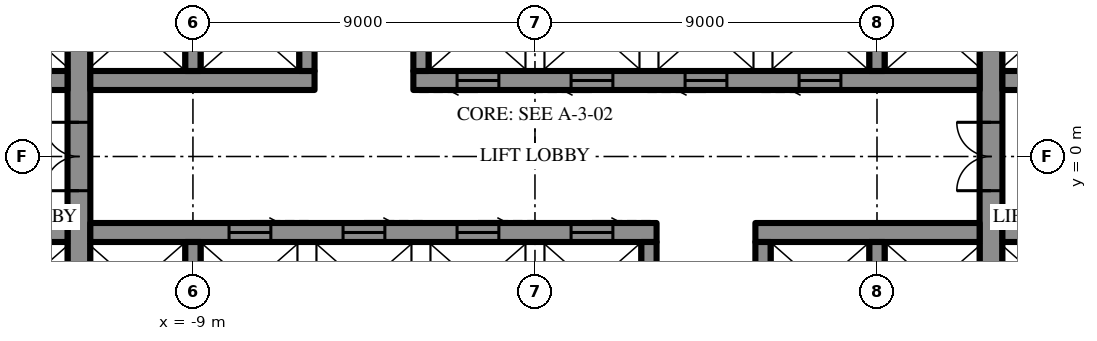
"""IFC4 building model, lengths in metres.
Left out: names, types, materials, properties, quantities, classifications, styles, units other than length and angle.
Written with IfcOpenShell. Run it as: python <this file> out.ifc"""

import sys

from ifc_helpers import new_model, si_unit, direction, frame, frame_2d, origin, place, context, subcontext, project, spatial, rectangle, extrude, element, fill, save


model = new_model("IFC4")
c1 = context("Model", 3, precision=1e-05, world=origin(), true_north=direction((0.0, 1.0)))
c2 = subcontext(c1, "Body", "Model", "MODEL_VIEW")
j1 = project(units=[si_unit("LENGTHUNIT", "METRE"), si_unit("PLANEANGLEUNIT", "RADIAN")], contexts=[c1])
p1 = place(None, origin())
s1 = spatial("IfcSite", under=j1, at=p1, CompositionType="ELEMENT")
p2 = place(p1, origin())
s2 = spatial("IfcBuilding", under=s1, at=p2, CompositionType="ELEMENT")
p3 = place(p2, frame((0.0, 0.0, 195.1)))
s3 = spatial("IfcBuildingStorey", under=s2, at=p3, CompositionType="ELEMENT", Elevation=195.1)
p4 = place(p3, frame((12.0, -10.7, 0.0), z_axis=(0.0, 0.0, 1.0), x_axis=(0.0, 1.0, 0.0)))
e1 = element("IfcWall", 1, at=p4, inside=s3, PredefinedType="SHEAR", context=c2, shape_type="SweptSolid", body=[
    extrude(rectangle(XDim=21.4, YDim=0.6, at=frame_2d((10.7, 0.0))), origin(), (0.0, 0.0, 1.0), 4.2),
])
p5 = place(p4, frame((9.8, 0.0, 0.0)))
e2 = element("IfcOpeningElement", 2, at=p5, cuts=e1, PredefinedType="OPENING", context=c2, shape_type="SweptSolid", body=[
    extrude(rectangle(XDim=1.8, YDim=2.4, at=frame_2d((0.9, 1.2))), frame((0.0, 0.31, 0.0), z_axis=(0.0, -1.0, 0.0), x_axis=(1.0, 0.0, 0.0)), (0.0, 0.0, 1.0), 0.62),
])
p6 = place(p3, frame((-12.0, -10.7, 0.0), z_axis=(0.0, 0.0, 1.0), x_axis=(0.0, 1.0, 0.0)))
e3 = element("IfcWall", 3, at=p6, inside=s3, PredefinedType="SHEAR", context=c2, shape_type="SweptSolid", body=[
    extrude(rectangle(XDim=21.4, YDim=0.6, at=frame_2d((10.7, 0.0))), origin(), (0.0, 0.0, 1.0), 4.2),
])
p7 = place(p6, frame((9.8, 0.0, 0.0)))
e4 = element("IfcOpeningElement", 4, at=p7, cuts=e3, PredefinedType="OPENING", context=c2, shape_type="SweptSolid", body=[
    extrude(rectangle(XDim=1.8, YDim=2.4, at=frame_2d((0.9, 1.2))), frame((0.0, 0.31, 0.0), z_axis=(0.0, -1.0, 0.0), x_axis=(1.0, 0.0, 0.0)), (0.0, 0.0, 1.0), 0.62),
])
p8 = place(p3, frame((-14.7, 2.0, 0.0), z_axis=(0.0, 0.0, 1.0), x_axis=(1.0, 0.0, 0.0)))
e5 = element("IfcWall", 5, at=p8, inside=s3, PredefinedType="SHEAR", context=c2, shape_type="SweptSolid", body=[
    extrude(rectangle(XDim=2.4, YDim=0.5, at=frame_2d((1.2, 0.0))), origin(), (0.0, 0.0, 1.0), 4.2),
])
p9 = place(p3, frame((-11.7, 2.0, 0.0), z_axis=(0.0, 0.0, 1.0), x_axis=(1.0, 0.0, 0.0)))
e6 = element("IfcWall", 6, at=p9, inside=s3, PredefinedType="SHEAR", context=c2, shape_type="SweptSolid", body=[
    extrude(rectangle(XDim=5.9, YDim=0.5, at=frame_2d((2.95, 0.0))), origin(), (0.0, 0.0, 1.0), 4.2),
])
p10 = place(p3, frame((-3.2, 2.0, 0.0), z_axis=(0.0, 0.0, 1.0), x_axis=(1.0, 0.0, 0.0)))
e7 = element("IfcWall", 7, at=p10, inside=s3, PredefinedType="SHEAR", context=c2, shape_type="SweptSolid", body=[
    extrude(rectangle(XDim=14.9, YDim=0.5, at=frame_2d((7.45, 0.0))), origin(), (0.0, 0.0, 1.0), 4.2),
])
p11 = place(p10, frame((1.15, 0.0, 0.0)))
e8 = element("IfcOpeningElement", 8, at=p11, cuts=e7, PredefinedType="OPENING", context=c2, shape_type="SweptSolid", body=[
    extrude(rectangle(XDim=1.1, YDim=2.2, at=frame_2d((0.55, 1.1))), frame((0.0, 0.26, 0.0), z_axis=(0.0, -1.0, 0.0), x_axis=(1.0, 0.0, 0.0)), (0.0, 0.0, 1.0), 0.52),
])
p12 = place(p10, frame((4.15, 0.0, 0.0)))
e9 = element("IfcOpeningElement", 9, at=p12, cuts=e7, PredefinedType="OPENING", context=c2, shape_type="SweptSolid", body=[
    extrude(rectangle(XDim=1.1, YDim=2.2, at=frame_2d((0.55, 1.1))), frame((0.0, 0.26, 0.0), z_axis=(0.0, -1.0, 0.0), x_axis=(1.0, 0.0, 0.0)), (0.0, 0.0, 1.0), 0.52),
])
p13 = place(p10, frame((7.15, 0.0, 0.0)))
e10 = element("IfcOpeningElement", 10, at=p13, cuts=e7, PredefinedType="OPENING", context=c2, shape_type="SweptSolid", body=[
    extrude(rectangle(XDim=1.1, YDim=2.2, at=frame_2d((0.55, 1.1))), frame((0.0, 0.26, 0.0), z_axis=(0.0, -1.0, 0.0), x_axis=(1.0, 0.0, 0.0)), (0.0, 0.0, 1.0), 0.52),
])
p14 = place(p10, frame((10.15, 0.0, 0.0)))
e11 = element("IfcOpeningElement", 11, at=p14, cuts=e7, PredefinedType="OPENING", context=c2, shape_type="SweptSolid", body=[
    extrude(rectangle(XDim=1.1, YDim=2.2, at=frame_2d((0.55, 1.1))), frame((0.0, 0.26, 0.0), z_axis=(0.0, -1.0, 0.0), x_axis=(1.0, 0.0, 0.0)), (0.0, 0.0, 1.0), 0.52),
])
p15 = place(p3, frame((12.3, 2.0, 0.0), z_axis=(0.0, 0.0, 1.0), x_axis=(1.0, 0.0, 0.0)))
e12 = element("IfcWall", 12, at=p15, inside=s3, PredefinedType="SHEAR", context=c2, shape_type="SweptSolid", body=[
    extrude(rectangle(XDim=2.4, YDim=0.5, at=frame_2d((1.2, 0.0))), origin(), (0.0, 0.0, 1.0), 4.2),
])
for number, where, z_axis, x_axis in (
    (13, (-9.0, 2.25, 0.0), (0.0, 0.0, 1.0), (0.0, 1.0, 0.0)),
    (14, (-6.0, 2.25, 0.0), (0.0, 0.0, 1.0), (0.0, 1.0, 0.0)),
    (15, (-3.0, 2.25, 0.0), (0.0, 0.0, 1.0), (0.0, 1.0, 0.0)),
    (16, (9.0, 2.25, 0.0), (0.0, 0.0, 1.0), (0.0, 1.0, 0.0)),
):
    element("IfcWall", number, at=place(p3, frame(where, z_axis=z_axis, x_axis=x_axis)), inside=s3, PredefinedType="SHEAR", context=c2, shape_type="SweptSolid", body=[
        extrude(rectangle(XDim=2.3, YDim=0.4, at=frame_2d((1.15, 0.0))), origin(), (0.0, 0.0, 1.0), 4.2),
    ])
p16 = place(p3, frame((14.7, -2.0, 0.0), z_axis=(0.0, 0.0, 1.0), x_axis=(-1.0, 0.0, 0.0)))
e17 = element("IfcWall", 17, at=p16, inside=s3, PredefinedType="SHEAR", context=c2, shape_type="SweptSolid", body=[
    extrude(rectangle(XDim=2.4, YDim=0.5, at=frame_2d((1.2, 0.0))), origin(), (0.0, 0.0, 1.0), 4.2),
])
p17 = place(p3, frame((11.7, -2.0, 0.0), z_axis=(0.0, 0.0, 1.0), x_axis=(-1.0, 0.0, 0.0)))
e18 = element("IfcWall", 18, at=p17, inside=s3, PredefinedType="SHEAR", context=c2, shape_type="SweptSolid", body=[
    extrude(rectangle(XDim=5.9, YDim=0.5, at=frame_2d((2.95, 0.0))), origin(), (0.0, 0.0, 1.0), 4.2),
])
p18 = place(p3, frame((3.2, -2.0, 0.0), z_axis=(0.0, 0.0, 1.0), x_axis=(-1.0, 0.0, 0.0)))
e19 = element("IfcWall", 19, at=p18, inside=s3, PredefinedType="SHEAR", context=c2, shape_type="SweptSolid", body=[
    extrude(rectangle(XDim=14.9, YDim=0.5, at=frame_2d((7.45, 0.0))), origin(), (0.0, 0.0, 1.0), 4.2),
])
p19 = place(p18, frame((1.15, 0.0, 0.0)))
e20 = element("IfcOpeningElement", 20, at=p19, cuts=e19, PredefinedType="OPENING", context=c2, shape_type="SweptSolid", body=[
    extrude(rectangle(XDim=1.1, YDim=2.2, at=frame_2d((0.55, 1.1))), frame((0.0, 0.26, 0.0), z_axis=(0.0, -1.0, 0.0), x_axis=(1.0, 0.0, 0.0)), (0.0, 0.0, 1.0), 0.52),
])
p20 = place(p18, frame((4.15, 0.0, 0.0)))
e21 = element("IfcOpeningElement", 21, at=p20, cuts=e19, PredefinedType="OPENING", context=c2, shape_type="SweptSolid", body=[
    extrude(rectangle(XDim=1.1, YDim=2.2, at=frame_2d((0.55, 1.1))), frame((0.0, 0.26, 0.0), z_axis=(0.0, -1.0, 0.0), x_axis=(1.0, 0.0, 0.0)), (0.0, 0.0, 1.0), 0.52),
])
p21 = place(p18, frame((7.15, 0.0, 0.0)))
e22 = element("IfcOpeningElement", 22, at=p21, cuts=e19, PredefinedType="OPENING", context=c2, shape_type="SweptSolid", body=[
    extrude(rectangle(XDim=1.1, YDim=2.2, at=frame_2d((0.55, 1.1))), frame((0.0, 0.26, 0.0), z_axis=(0.0, -1.0, 0.0), x_axis=(1.0, 0.0, 0.0)), (0.0, 0.0, 1.0), 0.52),
])
p22 = place(p18, frame((10.15, 0.0, 0.0)))
e23 = element("IfcOpeningElement", 23, at=p22, cuts=e19, PredefinedType="OPENING", context=c2, shape_type="SweptSolid", body=[
    extrude(rectangle(XDim=1.1, YDim=2.2, at=frame_2d((0.55, 1.1))), frame((0.0, 0.26, 0.0), z_axis=(0.0, -1.0, 0.0), x_axis=(1.0, 0.0, 0.0)), (0.0, 0.0, 1.0), 0.52),
])
p23 = place(p3, frame((-12.3, -2.0, 0.0), z_axis=(0.0, 0.0, 1.0), x_axis=(-1.0, 0.0, 0.0)))
e24 = element("IfcWall", 24, at=p23, inside=s3, PredefinedType="SHEAR", context=c2, shape_type="SweptSolid", body=[
    extrude(rectangle(XDim=2.4, YDim=0.5, at=frame_2d((1.2, 0.0))), origin(), (0.0, 0.0, 1.0), 4.2),
])
for number, where, z_axis, x_axis in (
    (25, (9.0, -2.25, 0.0), (0.0, 0.0, 1.0), (0.0, -1.0, 0.0)),
    (26, (6.0, -2.25, 0.0), (0.0, 0.0, 1.0), (0.0, -1.0, 0.0)),
    (27, (3.0, -2.25, 0.0), (0.0, 0.0, 1.0), (0.0, -1.0, 0.0)),
    (28, (-9.0, -2.25, 0.0), (0.0, 0.0, 1.0), (0.0, -1.0, 0.0)),
):
    element("IfcWall", number, at=place(p3, frame(where, z_axis=z_axis, x_axis=x_axis)), inside=s3, PredefinedType="SHEAR", context=c2, shape_type="SweptSolid", body=[
        extrude(rectangle(XDim=2.3, YDim=0.4, at=frame_2d((1.15, 0.0))), origin(), (0.0, 0.0, 1.0), 4.2),
    ])
p24 = place(p5, origin())
e29 = element("IfcDoor", 29, at=p24, inside=s3, OperationType="DOUBLE_DOOR_SINGLE_SWING", PredefinedType="DOOR", context=c2, shape_type="SweptSolid", body=[
    extrude(rectangle(XDim=1.8, YDim=2.4, at=frame_2d((0.9, 1.2))), frame((0.0, 0.025, 0.0), z_axis=(0.0, -1.0, 0.0), x_axis=(1.0, 0.0, 0.0)), (0.0, 0.0, 1.0), 0.05),
])
fill(e2, e29)
p25 = place(p7, origin())
e30 = element("IfcDoor", 30, at=p25, inside=s3, OperationType="DOUBLE_DOOR_SINGLE_SWING", PredefinedType="DOOR", context=c2, shape_type="SweptSolid", body=[
    extrude(rectangle(XDim=1.8, YDim=2.4, at=frame_2d((0.9, 1.2))), frame((0.0, 0.025, 0.0), z_axis=(0.0, -1.0, 0.0), x_axis=(1.0, 0.0, 0.0)), (0.0, 0.0, 1.0), 0.05),
])
fill(e4, e30)
p26 = place(p11, frame((1.1, 0.0, 0.0), z_axis=(0.0, 0.0, 1.0), x_axis=(-1.0, 0.0, 0.0)))
e31 = element("IfcDoor", 31, at=p26, inside=s3, OperationType="SLIDING_TO_LEFT", PredefinedType="DOOR", context=c2, shape_type="SweptSolid", body=[
    extrude(rectangle(XDim=1.1, YDim=2.2, at=frame_2d((0.55, 1.1))), frame((0.0, 0.025, 0.0), z_axis=(0.0, -1.0, 0.0), x_axis=(1.0, 0.0, 0.0)), (0.0, 0.0, 1.0), 0.05),
])
fill(e8, e31)
p27 = place(p12, frame((1.1, 0.0, 0.0), z_axis=(0.0, 0.0, 1.0), x_axis=(-1.0, 0.0, 0.0)))
e32 = element("IfcDoor", 32, at=p27, inside=s3, OperationType="SLIDING_TO_LEFT", PredefinedType="DOOR", context=c2, shape_type="SweptSolid", body=[
    extrude(rectangle(XDim=1.1, YDim=2.2, at=frame_2d((0.55, 1.1))), frame((0.0, 0.025, 0.0), z_axis=(0.0, -1.0, 0.0), x_axis=(1.0, 0.0, 0.0)), (0.0, 0.0, 1.0), 0.05),
])
fill(e9, e32)
p28 = place(p13, frame((1.1, 0.0, 0.0), z_axis=(0.0, 0.0, 1.0), x_axis=(-1.0, 0.0, 0.0)))
e33 = element("IfcDoor", 33, at=p28, inside=s3, OperationType="SLIDING_TO_LEFT", PredefinedType="DOOR", context=c2, shape_type="SweptSolid", body=[
    extrude(rectangle(XDim=1.1, YDim=2.2, at=frame_2d((0.55, 1.1))), frame((0.0, 0.025, 0.0), z_axis=(0.0, -1.0, 0.0), x_axis=(1.0, 0.0, 0.0)), (0.0, 0.0, 1.0), 0.05),
])
fill(e10, e33)
p29 = place(p14, frame((1.1, 0.0, 0.0), z_axis=(0.0, 0.0, 1.0), x_axis=(-1.0, 0.0, 0.0)))
e34 = element("IfcDoor", 34, at=p29, inside=s3, OperationType="SLIDING_TO_LEFT", PredefinedType="DOOR", context=c2, shape_type="SweptSolid", body=[
    extrude(rectangle(XDim=1.1, YDim=2.2, at=frame_2d((0.55, 1.1))), frame((0.0, 0.025, 0.0), z_axis=(0.0, -1.0, 0.0), x_axis=(1.0, 0.0, 0.0)), (0.0, 0.0, 1.0), 0.05),
])
fill(e11, e34)
p30 = place(p19, frame((1.1, 0.0, 0.0), z_axis=(0.0, 0.0, 1.0), x_axis=(-1.0, 0.0, 0.0)))
e35 = element("IfcDoor", 35, at=p30, inside=s3, OperationType="SLIDING_TO_LEFT", PredefinedType="DOOR", context=c2, shape_type="SweptSolid", body=[
    extrude(rectangle(XDim=1.1, YDim=2.2, at=frame_2d((0.55, 1.1))), frame((0.0, 0.025, 0.0), z_axis=(0.0, -1.0, 0.0), x_axis=(1.0, 0.0, 0.0)), (0.0, 0.0, 1.0), 0.05),
])
fill(e20, e35)
p31 = place(p20, frame((1.1, 0.0, 0.0), z_axis=(0.0, 0.0, 1.0), x_axis=(-1.0, 0.0, 0.0)))
e36 = element("IfcDoor", 36, at=p31, inside=s3, OperationType="SLIDING_TO_LEFT", PredefinedType="DOOR", context=c2, shape_type="SweptSolid", body=[
    extrude(rectangle(XDim=1.1, YDim=2.2, at=frame_2d((0.55, 1.1))), frame((0.0, 0.025, 0.0), z_axis=(0.0, -1.0, 0.0), x_axis=(1.0, 0.0, 0.0)), (0.0, 0.0, 1.0), 0.05),
])
fill(e21, e36)
p32 = place(p21, frame((1.1, 0.0, 0.0), z_axis=(0.0, 0.0, 1.0), x_axis=(-1.0, 0.0, 0.0)))
e37 = element("IfcDoor", 37, at=p32, inside=s3, OperationType="SLIDING_TO_LEFT", PredefinedType="DOOR", context=c2, shape_type="SweptSolid", body=[
    extrude(rectangle(XDim=1.1, YDim=2.2, at=frame_2d((0.55, 1.1))), frame((0.0, 0.025, 0.0), z_axis=(0.0, -1.0, 0.0), x_axis=(1.0, 0.0, 0.0)), (0.0, 0.0, 1.0), 0.05),
])
fill(e22, e37)
p33 = place(p22, frame((1.1, 0.0, 0.0), z_axis=(0.0, 0.0, 1.0), x_axis=(-1.0, 0.0, 0.0)))
e38 = element("IfcDoor", 38, at=p33, inside=s3, OperationType="SLIDING_TO_LEFT", PredefinedType="DOOR", context=c2, shape_type="SweptSolid", body=[
    extrude(rectangle(XDim=1.1, YDim=2.2, at=frame_2d((0.55, 1.1))), frame((0.0, 0.025, 0.0), z_axis=(0.0, -1.0, 0.0), x_axis=(1.0, 0.0, 0.0)), (0.0, 0.0, 1.0), 0.05),
])
fill(e23, e38)
save(model, sys.argv[1])
